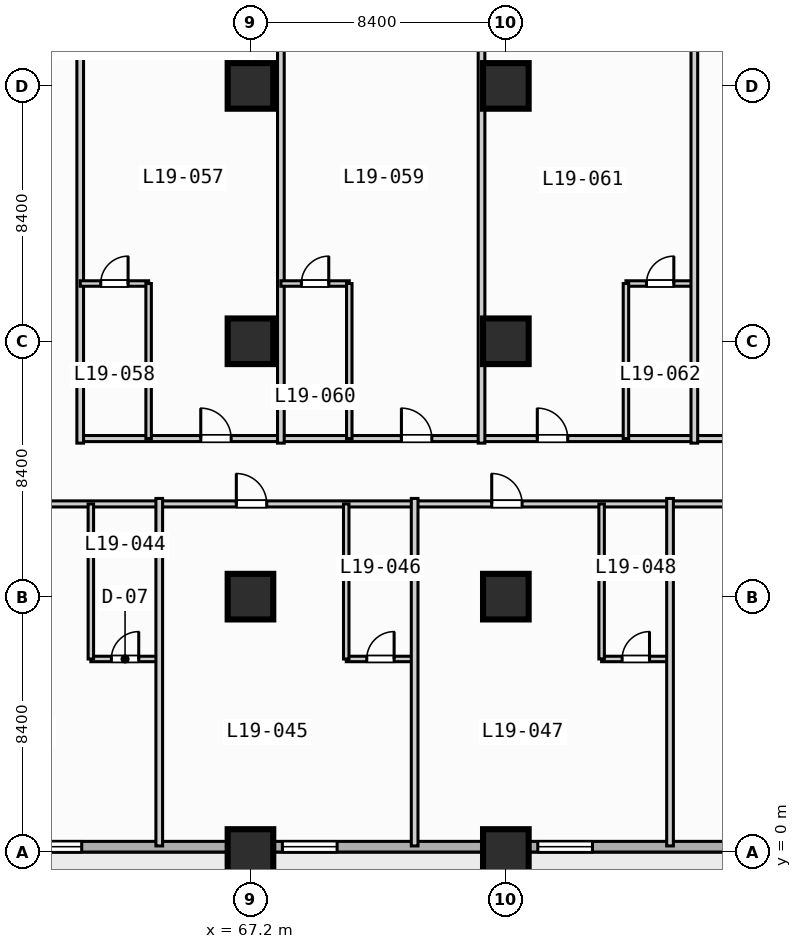
"""IFC4 building model, lengths in metres.
Left out: names, types, materials, properties, quantities, classifications, styles, units other than length and angle.
Written with IfcOpenShell. Run it as: python <this file> out.ifc"""

import sys

from ifc_helpers import new_model, si_unit, direction, frame, frame_2d, origin, origin_2d, place, context, subcontext, project, spatial, rectangle, extrude, element, fill, save


model = new_model("IFC4")
c1 = context("Model", 3, precision=1e-05, world=origin(), true_north=direction((0.0, 1.0)))
c2 = subcontext(c1, "Body", "Model", "MODEL_VIEW")
j1 = project(units=[si_unit("LENGTHUNIT", "METRE"), si_unit("PLANEANGLEUNIT", "RADIAN")], contexts=[c1])
p1 = place(None, origin())
s1 = spatial("IfcSite", under=j1, at=p1, CompositionType="ELEMENT")
p2 = place(p1, origin())
s2 = spatial("IfcBuilding", under=s1, at=p2, CompositionType="ELEMENT")
p3 = place(p2, frame((0.0, 0.0, 81.4)))
s3 = spatial("IfcBuildingStorey", under=s2, at=p3, CompositionType="ELEMENT", Elevation=81.4)
for number, where, z_axis, x_axis in (
    (1, (67.2, 0.0, 0.0), (0.0, 0.0, 1.0), (1.0, 0.0, 0.0)),
    (2, (67.2, 8.4, 0.0), (0.0, 0.0, 1.0), (1.0, 0.0, 0.0)),
    (3, (67.2, 16.8, 0.0), (0.0, 0.0, 1.0), (1.0, 0.0, 0.0)),
    (4, (67.2, 25.2, 0.0), (0.0, 0.0, 1.0), (1.0, 0.0, 0.0)),
    (5, (75.6, 0.0, 0.0), (0.0, 0.0, 1.0), (1.0, 0.0, 0.0)),
    (6, (75.6, 8.4, 0.0), (0.0, 0.0, 1.0), (1.0, 0.0, 0.0)),
    (7, (75.6, 16.8, 0.0), (0.0, 0.0, 1.0), (1.0, 0.0, 0.0)),
    (8, (75.6, 25.2, 0.0), (0.0, 0.0, 1.0), (1.0, 0.0, 0.0)),
):
    element("IfcColumn", number, at=place(p3, frame(where, z_axis=z_axis, x_axis=x_axis)), inside=s3, PredefinedType="COLUMN", context=c2, shape_type="SweptSolid", body=[
        extrude(rectangle(XDim=1.5, YDim=1.5, at=origin_2d()), origin(), (0.0, 0.0, 1.0), 3.8),
    ])
p4 = place(p3, frame((89.225, 0.175, 0.0), z_axis=(0.0, 0.0, 1.0), x_axis=(-1.0, 0.0, 0.0)))
e9 = element("IfcWall", 9, at=p4, inside=s3, PredefinedType="STANDARD", context=c2, shape_type="SweptSolid", body=[
    extrude(rectangle(XDim=86.05, YDim=0.35, at=frame_2d((43.025, 0.0))), origin(), (0.0, 0.0, 1.0), 3.55),
])
p5 = place(p4, frame((67.525, 0.0, 0.0)))
e10 = element("IfcOpeningElement", 10, at=p5, cuts=e9, PredefinedType="OPENING", context=c2, shape_type="SweptSolid", body=[
    extrude(rectangle(XDim=1.4, YDim=2.2, at=frame_2d((0.7, 1.1))), frame((0.0, 0.185, 0.0), z_axis=(0.0, -1.0, 0.0), x_axis=(1.0, 0.0, 0.0)), (0.0, 0.0, 1.0), 0.37),
])
p6 = place(p4, frame((58.725, 0.0, 0.85)))
e11 = element("IfcOpeningElement", 11, at=p6, cuts=e9, PredefinedType="OPENING", context=c2, shape_type="SweptSolid", body=[
    extrude(rectangle(XDim=2.2, YDim=1.8, at=frame_2d((1.1, 0.9))), frame((0.0, 0.185, 0.0), z_axis=(0.0, -1.0, 0.0), x_axis=(1.0, 0.0, 0.0)), (0.0, 0.0, 1.0), 0.37),
])
p7 = place(p4, frame((50.325, 0.0, 0.85)))
e12 = element("IfcOpeningElement", 12, at=p7, cuts=e9, PredefinedType="OPENING", context=c2, shape_type="SweptSolid", body=[
    extrude(rectangle(XDim=2.2, YDim=1.8, at=frame_2d((1.1, 0.9))), frame((0.0, 0.185, 0.0), z_axis=(0.0, -1.0, 0.0), x_axis=(1.0, 0.0, 0.0)), (0.0, 0.0, 1.0), 0.37),
])
p8 = place(p4, frame((41.925, 0.0, 0.85)))
e13 = element("IfcOpeningElement", 13, at=p8, cuts=e9, PredefinedType="OPENING", context=c2, shape_type="SweptSolid", body=[
    extrude(rectangle(XDim=2.2, YDim=1.8, at=frame_2d((1.1, 0.9))), frame((0.0, 0.185, 0.0), z_axis=(0.0, -1.0, 0.0), x_axis=(1.0, 0.0, 0.0)), (0.0, 0.0, 1.0), 0.37),
])
p9 = place(p4, frame((27.575, 0.0, 0.85)))
e14 = element("IfcOpeningElement", 14, at=p9, cuts=e9, PredefinedType="OPENING", context=c2, shape_type="SweptSolid", body=[
    extrude(rectangle(XDim=1.8, YDim=1.8, at=frame_2d((0.9, 0.9))), frame((0.0, 0.185, 0.0), z_axis=(0.0, -1.0, 0.0), x_axis=(1.0, 0.0, 0.0)), (0.0, 0.0, 1.0), 0.37),
])
p10 = place(p4, frame((19.175, 0.0, 0.85)))
e15 = element("IfcOpeningElement", 15, at=p10, cuts=e9, PredefinedType="OPENING", context=c2, shape_type="SweptSolid", body=[
    extrude(rectangle(XDim=1.8, YDim=1.8, at=frame_2d((0.9, 0.9))), frame((0.0, 0.185, 0.0), z_axis=(0.0, -1.0, 0.0), x_axis=(1.0, 0.0, 0.0)), (0.0, 0.0, 1.0), 0.37),
])
p11 = place(p4, frame((10.775, 0.0, 0.85)))
e16 = element("IfcOpeningElement", 16, at=p11, cuts=e9, PredefinedType="OPENING", context=c2, shape_type="SweptSolid", body=[
    extrude(rectangle(XDim=1.8, YDim=1.8, at=frame_2d((0.9, 0.9))), frame((0.0, 0.185, 0.0), z_axis=(0.0, -1.0, 0.0), x_axis=(1.0, 0.0, 0.0)), (0.0, 0.0, 1.0), 0.37),
])
p12 = place(p4, frame((2.425, 0.0, 0.85)))
e17 = element("IfcOpeningElement", 17, at=p12, cuts=e9, PredefinedType="OPENING", context=c2, shape_type="SweptSolid", body=[
    extrude(rectangle(XDim=1.8, YDim=1.8, at=frame_2d((0.9, 0.9))), frame((0.0, 0.185, 0.0), z_axis=(0.0, -1.0, 0.0), x_axis=(1.0, 0.0, 0.0)), (0.0, 0.0, 1.0), 0.37),
])
p13 = place(p3, frame((55.8, 11.45, 0.0), z_axis=(0.0, 0.0, 1.0), x_axis=(1.0, 0.0, 0.0)))
e18 = element("IfcWall", 18, at=p13, inside=s3, PredefinedType="PARTITIONING", context=c2, shape_type="SweptSolid", body=[
    extrude(rectangle(XDim=33.0, YDim=0.2, at=frame_2d((16.5, 0.0))), origin(), (0.0, 0.0, 1.0), 3.55),
])
p14 = place(p13, frame((2.535, 0.0, 0.0)))
e19 = element("IfcOpeningElement", 19, at=p14, cuts=e18, PredefinedType="OPENING", context=c2, shape_type="SweptSolid", body=[
    extrude(rectangle(XDim=1.0, YDim=2.15, at=frame_2d((0.5, 1.075))), frame((0.0, 0.11, 0.0), z_axis=(0.0, -1.0, 0.0), x_axis=(1.0, 0.0, 0.0)), (0.0, 0.0, 1.0), 0.22),
])
p15 = place(p13, frame((10.935, 0.0, 0.0)))
e20 = element("IfcOpeningElement", 20, at=p15, cuts=e18, PredefinedType="OPENING", context=c2, shape_type="SweptSolid", body=[
    extrude(rectangle(XDim=1.0, YDim=2.15, at=frame_2d((0.5, 1.075))), frame((0.0, 0.11, 0.0), z_axis=(0.0, -1.0, 0.0), x_axis=(1.0, 0.0, 0.0)), (0.0, 0.0, 1.0), 0.22),
])
p16 = place(p13, frame((19.335, 0.0, 0.0)))
e21 = element("IfcOpeningElement", 21, at=p16, cuts=e18, PredefinedType="OPENING", context=c2, shape_type="SweptSolid", body=[
    extrude(rectangle(XDim=1.0, YDim=2.15, at=frame_2d((0.5, 1.075))), frame((0.0, 0.11, 0.0), z_axis=(0.0, -1.0, 0.0), x_axis=(1.0, 0.0, 0.0)), (0.0, 0.0, 1.0), 0.22),
])
p17 = place(p13, frame((27.435, 0.0, 0.0)))
e22 = element("IfcOpeningElement", 22, at=p17, cuts=e18, PredefinedType="OPENING", context=c2, shape_type="SweptSolid", body=[
    extrude(rectangle(XDim=1.0, YDim=2.15, at=frame_2d((0.5, 1.075))), frame((0.0, 0.11, 0.0), z_axis=(0.0, -1.0, 0.0), x_axis=(1.0, 0.0, 0.0)), (0.0, 0.0, 1.0), 0.22),
])
p18 = place(p3, frame((61.95, 6.35, 0.0), z_axis=(0.0, 0.0, 1.0), x_axis=(1.0, 0.0, 0.0)))
e23 = element("IfcWall", 23, at=p18, inside=s3, PredefinedType="PLUMBINGWALL", context=c2, shape_type="SweptSolid", body=[
    extrude(rectangle(XDim=2.25, YDim=0.18, at=frame_2d((1.125, 0.0))), origin(), (0.0, 0.0, 1.0), 3.55),
])
p19 = place(p18, frame((0.675, 0.0, 0.0)))
e24 = element("IfcOpeningElement", 24, at=p19, cuts=e23, PredefinedType="OPENING", context=c2, shape_type="SweptSolid", body=[
    extrude(rectangle(XDim=0.9, YDim=2.1, at=frame_2d((0.45, 1.05))), frame((0.0, 0.1, 0.0), z_axis=(0.0, -1.0, 0.0), x_axis=(1.0, 0.0, 0.0)), (0.0, 0.0, 1.0), 0.2),
])
p20 = place(p3, frame((61.95, 6.35, 0.0), z_axis=(0.0, 0.0, 1.0), x_axis=(0.0, 1.0, 0.0)))
e25 = element("IfcWall", 25, at=p20, inside=s3, PredefinedType="PLUMBINGWALL", context=c2, shape_type="SweptSolid", body=[
    extrude(rectangle(XDim=5.1, YDim=0.18, at=frame_2d((2.55, 0.0))), origin(), (0.0, 0.0, 1.0), 3.55),
])
p21 = place(p3, frame((64.2, 0.2, 0.0), z_axis=(0.0, 0.0, 1.0), x_axis=(0.0, 1.0, 0.0)))
e26 = element("IfcWall", 26, at=p21, inside=s3, PredefinedType="PARTITIONING", context=c2, shape_type="SweptSolid", body=[
    extrude(rectangle(XDim=11.43, YDim=0.22, at=frame_2d((5.715, 0.0))), origin(), (0.0, 0.0, 1.0), 3.55),
])
p22 = place(p3, frame((70.35, 6.35, 0.0), z_axis=(0.0, 0.0, 1.0), x_axis=(1.0, 0.0, 0.0)))
e27 = element("IfcWall", 27, at=p22, inside=s3, PredefinedType="PLUMBINGWALL", context=c2, shape_type="SweptSolid", body=[
    extrude(rectangle(XDim=2.25, YDim=0.18, at=frame_2d((1.125, 0.0))), origin(), (0.0, 0.0, 1.0), 3.55),
])
p23 = place(p22, frame((0.675, 0.0, 0.0)))
e28 = element("IfcOpeningElement", 28, at=p23, cuts=e27, PredefinedType="OPENING", context=c2, shape_type="SweptSolid", body=[
    extrude(rectangle(XDim=0.9, YDim=2.1, at=frame_2d((0.45, 1.05))), frame((0.0, 0.1, 0.0), z_axis=(0.0, -1.0, 0.0), x_axis=(1.0, 0.0, 0.0)), (0.0, 0.0, 1.0), 0.2),
])
p24 = place(p3, frame((70.35, 6.35, 0.0), z_axis=(0.0, 0.0, 1.0), x_axis=(0.0, 1.0, 0.0)))
e29 = element("IfcWall", 29, at=p24, inside=s3, PredefinedType="PLUMBINGWALL", context=c2, shape_type="SweptSolid", body=[
    extrude(rectangle(XDim=5.1, YDim=0.18, at=frame_2d((2.55, 0.0))), origin(), (0.0, 0.0, 1.0), 3.55),
])
p25 = place(p3, frame((72.6, 0.2, 0.0), z_axis=(0.0, 0.0, 1.0), x_axis=(0.0, 1.0, 0.0)))
e30 = element("IfcWall", 30, at=p25, inside=s3, PredefinedType="PARTITIONING", context=c2, shape_type="SweptSolid", body=[
    extrude(rectangle(XDim=11.43, YDim=0.22, at=frame_2d((5.715, 0.0))), origin(), (0.0, 0.0, 1.0), 3.55),
])
p26 = place(p3, frame((78.75, 6.35, 0.0), z_axis=(0.0, 0.0, 1.0), x_axis=(1.0, 0.0, 0.0)))
e31 = element("IfcWall", 31, at=p26, inside=s3, PredefinedType="PLUMBINGWALL", context=c2, shape_type="SweptSolid", body=[
    extrude(rectangle(XDim=2.25, YDim=0.18, at=frame_2d((1.125, 0.0))), origin(), (0.0, 0.0, 1.0), 3.55),
])
p27 = place(p26, frame((0.675, 0.0, 0.0)))
e32 = element("IfcOpeningElement", 32, at=p27, cuts=e31, PredefinedType="OPENING", context=c2, shape_type="SweptSolid", body=[
    extrude(rectangle(XDim=0.9, YDim=2.1, at=frame_2d((0.45, 1.05))), frame((0.0, 0.1, 0.0), z_axis=(0.0, -1.0, 0.0), x_axis=(1.0, 0.0, 0.0)), (0.0, 0.0, 1.0), 0.2),
])
p28 = place(p3, frame((78.75, 6.35, 0.0), z_axis=(0.0, 0.0, 1.0), x_axis=(0.0, 1.0, 0.0)))
e33 = element("IfcWall", 33, at=p28, inside=s3, PredefinedType="PLUMBINGWALL", context=c2, shape_type="SweptSolid", body=[
    extrude(rectangle(XDim=5.1, YDim=0.18, at=frame_2d((2.55, 0.0))), origin(), (0.0, 0.0, 1.0), 3.55),
])
p29 = place(p3, frame((81.0, 0.2, 0.0), z_axis=(0.0, 0.0, 1.0), x_axis=(0.0, 1.0, 0.0)))
e34 = element("IfcWall", 34, at=p29, inside=s3, PredefinedType="PARTITIONING", context=c2, shape_type="SweptSolid", body=[
    extrude(rectangle(XDim=11.43, YDim=0.22, at=frame_2d((5.715, 0.0))), origin(), (0.0, 0.0, 1.0), 3.55),
])
p30 = place(p3, frame((61.6, 13.6, 0.0), z_axis=(0.0, 0.0, 1.0), x_axis=(1.0, 0.0, 0.0)))
e35 = element("IfcWall", 35, at=p30, inside=s3, PredefinedType="PARTITIONING", context=c2, shape_type="SweptSolid", body=[
    extrude(rectangle(XDim=27.2, YDim=0.2, at=frame_2d((13.6, 0.0))), origin(), (0.0, 0.0, 1.0), 3.55),
])
p31 = place(p30, frame((3.965, 0.0, 0.0)))
e36 = element("IfcOpeningElement", 36, at=p31, cuts=e35, PredefinedType="OPENING", context=c2, shape_type="SweptSolid", body=[
    extrude(rectangle(XDim=1.0, YDim=2.15, at=frame_2d((0.5, 1.075))), frame((0.0, 0.11, 0.0), z_axis=(0.0, -1.0, 0.0), x_axis=(1.0, 0.0, 0.0)), (0.0, 0.0, 1.0), 0.22),
])
p32 = place(p30, frame((10.565, 0.0, 0.0)))
e37 = element("IfcOpeningElement", 37, at=p32, cuts=e35, PredefinedType="OPENING", context=c2, shape_type="SweptSolid", body=[
    extrude(rectangle(XDim=1.0, YDim=2.15, at=frame_2d((0.5, 1.075))), frame((0.0, 0.11, 0.0), z_axis=(0.0, -1.0, 0.0), x_axis=(1.0, 0.0, 0.0)), (0.0, 0.0, 1.0), 0.22),
])
p33 = place(p30, frame((15.035, 0.0, 0.0)))
e38 = element("IfcOpeningElement", 38, at=p33, cuts=e35, PredefinedType="OPENING", context=c2, shape_type="SweptSolid", body=[
    extrude(rectangle(XDim=1.0, YDim=2.15, at=frame_2d((0.5, 1.075))), frame((0.0, 0.11, 0.0), z_axis=(0.0, -1.0, 0.0), x_axis=(1.0, 0.0, 0.0)), (0.0, 0.0, 1.0), 0.22),
])
p34 = place(p30, frame((22.035, 0.0, 0.0)))
e39 = element("IfcOpeningElement", 39, at=p34, cuts=e35, PredefinedType="OPENING", context=c2, shape_type="SweptSolid", body=[
    extrude(rectangle(XDim=1.0, YDim=2.15, at=frame_2d((0.5, 1.075))), frame((0.0, 0.11, 0.0), z_axis=(0.0, -1.0, 0.0), x_axis=(1.0, 0.0, 0.0)), (0.0, 0.0, 1.0), 0.22),
])
p35 = place(p3, frame((61.6, 13.45, 0.0), z_axis=(0.0, 0.0, 1.0), x_axis=(0.0, 1.0, 0.0)))
e40 = element("IfcWall", 40, at=p35, inside=s3, PredefinedType="PARTITIONING", context=c2, shape_type="SweptSolid", body=[
    extrude(rectangle(XDim=19.98, YDim=0.22, at=frame_2d((9.99, 0.0))), origin(), (0.0, 0.0, 1.0), 3.55),
])
p36 = place(p3, frame((61.6, 18.7, 0.0), z_axis=(0.0, 0.0, 1.0), x_axis=(1.0, 0.0, 0.0)))
e41 = element("IfcWall", 41, at=p36, inside=s3, PredefinedType="PLUMBINGWALL", context=c2, shape_type="SweptSolid", body=[
    extrude(rectangle(XDim=2.25, YDim=0.18, at=frame_2d((1.125, 0.0))), origin(), (0.0, 0.0, 1.0), 3.55),
])
p37 = place(p36, frame((0.675, 0.0, 0.0)))
e42 = element("IfcOpeningElement", 42, at=p37, cuts=e41, PredefinedType="OPENING", context=c2, shape_type="SweptSolid", body=[
    extrude(rectangle(XDim=0.9, YDim=2.1, at=frame_2d((0.45, 1.05))), frame((0.0, 0.1, 0.0), z_axis=(0.0, -1.0, 0.0), x_axis=(1.0, 0.0, 0.0)), (0.0, 0.0, 1.0), 0.2),
])
p38 = place(p3, frame((63.85, 13.6, 0.0), z_axis=(0.0, 0.0, 1.0), x_axis=(0.0, 1.0, 0.0)))
e43 = element("IfcWall", 43, at=p38, inside=s3, PredefinedType="PLUMBINGWALL", context=c2, shape_type="SweptSolid", body=[
    extrude(rectangle(XDim=5.1, YDim=0.18, at=frame_2d((2.55, 0.0))), origin(), (0.0, 0.0, 1.0), 3.55),
])
p39 = place(p3, frame((68.2, 13.45, 0.0), z_axis=(0.0, 0.0, 1.0), x_axis=(0.0, 1.0, 0.0)))
e44 = element("IfcWall", 44, at=p39, inside=s3, PredefinedType="PARTITIONING", context=c2, shape_type="SweptSolid", body=[
    extrude(rectangle(XDim=19.98, YDim=0.22, at=frame_2d((9.99, 0.0))), origin(), (0.0, 0.0, 1.0), 3.55),
])
p40 = place(p3, frame((68.2, 18.7, 0.0), z_axis=(0.0, 0.0, 1.0), x_axis=(1.0, 0.0, 0.0)))
e45 = element("IfcWall", 45, at=p40, inside=s3, PredefinedType="PLUMBINGWALL", context=c2, shape_type="SweptSolid", body=[
    extrude(rectangle(XDim=2.25, YDim=0.18, at=frame_2d((1.125, 0.0))), origin(), (0.0, 0.0, 1.0), 3.55),
])
p41 = place(p40, frame((0.675, 0.0, 0.0)))
e46 = element("IfcOpeningElement", 46, at=p41, cuts=e45, PredefinedType="OPENING", context=c2, shape_type="SweptSolid", body=[
    extrude(rectangle(XDim=0.9, YDim=2.1, at=frame_2d((0.45, 1.05))), frame((0.0, 0.1, 0.0), z_axis=(0.0, -1.0, 0.0), x_axis=(1.0, 0.0, 0.0)), (0.0, 0.0, 1.0), 0.2),
])
p42 = place(p3, frame((70.45, 13.6, 0.0), z_axis=(0.0, 0.0, 1.0), x_axis=(0.0, 1.0, 0.0)))
e47 = element("IfcWall", 47, at=p42, inside=s3, PredefinedType="PLUMBINGWALL", context=c2, shape_type="SweptSolid", body=[
    extrude(rectangle(XDim=5.1, YDim=0.18, at=frame_2d((2.55, 0.0))), origin(), (0.0, 0.0, 1.0), 3.55),
])
p43 = place(p3, frame((74.8, 13.45, 0.0), z_axis=(0.0, 0.0, 1.0), x_axis=(0.0, 1.0, 0.0)))
e48 = element("IfcWall", 48, at=p43, inside=s3, PredefinedType="PARTITIONING", context=c2, shape_type="SweptSolid", body=[
    extrude(rectangle(XDim=19.98, YDim=0.22, at=frame_2d((9.99, 0.0))), origin(), (0.0, 0.0, 1.0), 3.55),
])
p44 = place(p3, frame((79.55, 18.7, 0.0), z_axis=(0.0, 0.0, 1.0), x_axis=(1.0, 0.0, 0.0)))
e49 = element("IfcWall", 49, at=p44, inside=s3, PredefinedType="PLUMBINGWALL", context=c2, shape_type="SweptSolid", body=[
    extrude(rectangle(XDim=2.25, YDim=0.18, at=frame_2d((1.125, 0.0))), origin(), (0.0, 0.0, 1.0), 3.55),
])
p45 = place(p44, frame((0.675, 0.0, 0.0)))
e50 = element("IfcOpeningElement", 50, at=p45, cuts=e49, PredefinedType="OPENING", context=c2, shape_type="SweptSolid", body=[
    extrude(rectangle(XDim=0.9, YDim=2.1, at=frame_2d((0.45, 1.05))), frame((0.0, 0.1, 0.0), z_axis=(0.0, -1.0, 0.0), x_axis=(1.0, 0.0, 0.0)), (0.0, 0.0, 1.0), 0.2),
])
p46 = place(p3, frame((79.55, 13.6, 0.0), z_axis=(0.0, 0.0, 1.0), x_axis=(0.0, 1.0, 0.0)))
e51 = element("IfcWall", 51, at=p46, inside=s3, PredefinedType="PLUMBINGWALL", context=c2, shape_type="SweptSolid", body=[
    extrude(rectangle(XDim=5.1, YDim=0.18, at=frame_2d((2.55, 0.0))), origin(), (0.0, 0.0, 1.0), 3.55),
])
p47 = place(p3, frame((81.8, 13.45, 0.0), z_axis=(0.0, 0.0, 1.0), x_axis=(0.0, 1.0, 0.0)))
e52 = element("IfcWall", 52, at=p47, inside=s3, PredefinedType="PARTITIONING", context=c2, shape_type="SweptSolid", body=[
    extrude(rectangle(XDim=19.98, YDim=0.22, at=frame_2d((9.99, 0.0))), origin(), (0.0, 0.0, 1.0), 3.55),
])
p48 = place(p9, origin())
e53 = element("IfcWindow", 53, at=p48, inside=s3, PartitioningType="SINGLE_PANEL", PredefinedType="WINDOW", context=c2, shape_type="SweptSolid", body=[
    extrude(rectangle(XDim=1.8, YDim=1.8, at=frame_2d((0.9, 0.9))), frame((0.0, 0.03, 0.0), z_axis=(0.0, -1.0, 0.0), x_axis=(1.0, 0.0, 0.0)), (0.0, 0.0, 1.0), 0.06),
])
fill(e14, e53)
p49 = place(p10, origin())
e54 = element("IfcWindow", 54, at=p49, inside=s3, PartitioningType="SINGLE_PANEL", PredefinedType="WINDOW", context=c2, shape_type="SweptSolid", body=[
    extrude(rectangle(XDim=1.8, YDim=1.8, at=frame_2d((0.9, 0.9))), frame((0.0, 0.03, 0.0), z_axis=(0.0, -1.0, 0.0), x_axis=(1.0, 0.0, 0.0)), (0.0, 0.0, 1.0), 0.06),
])
fill(e15, e54)
p50 = place(p11, origin())
e55 = element("IfcWindow", 55, at=p50, inside=s3, PartitioningType="SINGLE_PANEL", PredefinedType="WINDOW", context=c2, shape_type="SweptSolid", body=[
    extrude(rectangle(XDim=1.8, YDim=1.8, at=frame_2d((0.9, 0.9))), frame((0.0, 0.03, 0.0), z_axis=(0.0, -1.0, 0.0), x_axis=(1.0, 0.0, 0.0)), (0.0, 0.0, 1.0), 0.06),
])
fill(e16, e55)
p51 = place(p15, origin())
e56 = element("IfcDoor", 56, at=p51, inside=s3, OperationType="SINGLE_SWING_LEFT", PredefinedType="DOOR", context=c2, shape_type="SweptSolid", body=[
    extrude(rectangle(XDim=1.0, YDim=2.15, at=frame_2d((0.5, 1.075))), frame((0.0, 0.025, 0.0), z_axis=(0.0, -1.0, 0.0), x_axis=(1.0, 0.0, 0.0)), (0.0, 0.0, 1.0), 0.05),
])
fill(e20, e56)
p52 = place(p16, origin())
e57 = element("IfcDoor", 57, at=p52, inside=s3, OperationType="SINGLE_SWING_LEFT", PredefinedType="DOOR", context=c2, shape_type="SweptSolid", body=[
    extrude(rectangle(XDim=1.0, YDim=2.15, at=frame_2d((0.5, 1.075))), frame((0.0, 0.025, 0.0), z_axis=(0.0, -1.0, 0.0), x_axis=(1.0, 0.0, 0.0)), (0.0, 0.0, 1.0), 0.05),
])
fill(e21, e57)
p53 = place(p19, origin())
e58 = element("IfcDoor", 58, at=p53, inside=s3, OperationType="SINGLE_SWING_RIGHT", PredefinedType="DOOR", context=c2, shape_type="SweptSolid", body=[
    extrude(rectangle(XDim=0.9, YDim=2.1, at=frame_2d((0.45, 1.05))), frame((0.0, 0.025, 0.0), z_axis=(0.0, -1.0, 0.0), x_axis=(1.0, 0.0, 0.0)), (0.0, 0.0, 1.0), 0.05),
])
fill(e24, e58)
p54 = place(p23, origin())
e59 = element("IfcDoor", 59, at=p54, inside=s3, OperationType="SINGLE_SWING_RIGHT", PredefinedType="DOOR", context=c2, shape_type="SweptSolid", body=[
    extrude(rectangle(XDim=0.9, YDim=2.1, at=frame_2d((0.45, 1.05))), frame((0.0, 0.025, 0.0), z_axis=(0.0, -1.0, 0.0), x_axis=(1.0, 0.0, 0.0)), (0.0, 0.0, 1.0), 0.05),
])
fill(e28, e59)
p55 = place(p27, origin())
e60 = element("IfcDoor", 60, at=p55, inside=s3, OperationType="SINGLE_SWING_RIGHT", PredefinedType="DOOR", context=c2, shape_type="SweptSolid", body=[
    extrude(rectangle(XDim=0.9, YDim=2.1, at=frame_2d((0.45, 1.05))), frame((0.0, 0.025, 0.0), z_axis=(0.0, -1.0, 0.0), x_axis=(1.0, 0.0, 0.0)), (0.0, 0.0, 1.0), 0.05),
])
fill(e32, e60)
p56 = place(p31, origin())
e61 = element("IfcDoor", 61, at=p56, inside=s3, OperationType="SINGLE_SWING_LEFT", PredefinedType="DOOR", context=c2, shape_type="SweptSolid", body=[
    extrude(rectangle(XDim=1.0, YDim=2.15, at=frame_2d((0.5, 1.075))), frame((0.0, 0.025, 0.0), z_axis=(0.0, -1.0, 0.0), x_axis=(1.0, 0.0, 0.0)), (0.0, 0.0, 1.0), 0.05),
])
fill(e36, e61)
p57 = place(p32, origin())
e62 = element("IfcDoor", 62, at=p57, inside=s3, OperationType="SINGLE_SWING_LEFT", PredefinedType="DOOR", context=c2, shape_type="SweptSolid", body=[
    extrude(rectangle(XDim=1.0, YDim=2.15, at=frame_2d((0.5, 1.075))), frame((0.0, 0.025, 0.0), z_axis=(0.0, -1.0, 0.0), x_axis=(1.0, 0.0, 0.0)), (0.0, 0.0, 1.0), 0.05),
])
fill(e37, e62)
p58 = place(p33, origin())
e63 = element("IfcDoor", 63, at=p58, inside=s3, OperationType="SINGLE_SWING_LEFT", PredefinedType="DOOR", context=c2, shape_type="SweptSolid", body=[
    extrude(rectangle(XDim=1.0, YDim=2.15, at=frame_2d((0.5, 1.075))), frame((0.0, 0.025, 0.0), z_axis=(0.0, -1.0, 0.0), x_axis=(1.0, 0.0, 0.0)), (0.0, 0.0, 1.0), 0.05),
])
fill(e38, e63)
p59 = place(p37, origin())
e64 = element("IfcDoor", 64, at=p59, inside=s3, OperationType="SINGLE_SWING_RIGHT", PredefinedType="DOOR", context=c2, shape_type="SweptSolid", body=[
    extrude(rectangle(XDim=0.9, YDim=2.1, at=frame_2d((0.45, 1.05))), frame((0.0, 0.025, 0.0), z_axis=(0.0, -1.0, 0.0), x_axis=(1.0, 0.0, 0.0)), (0.0, 0.0, 1.0), 0.05),
])
fill(e42, e64)
p60 = place(p41, origin())
e65 = element("IfcDoor", 65, at=p60, inside=s3, OperationType="SINGLE_SWING_RIGHT", PredefinedType="DOOR", context=c2, shape_type="SweptSolid", body=[
    extrude(rectangle(XDim=0.9, YDim=2.1, at=frame_2d((0.45, 1.05))), frame((0.0, 0.025, 0.0), z_axis=(0.0, -1.0, 0.0), x_axis=(1.0, 0.0, 0.0)), (0.0, 0.0, 1.0), 0.05),
])
fill(e46, e65)
p61 = place(p45, origin())
e66 = element("IfcDoor", 66, at=p61, inside=s3, OperationType="SINGLE_SWING_RIGHT", PredefinedType="DOOR", context=c2, shape_type="SweptSolid", body=[
    extrude(rectangle(XDim=0.9, YDim=2.1, at=frame_2d((0.45, 1.05))), frame((0.0, 0.025, 0.0), z_axis=(0.0, -1.0, 0.0), x_axis=(1.0, 0.0, 0.0)), (0.0, 0.0, 1.0), 0.05),
])
fill(e50, e66)
save(model, sys.argv[1])
